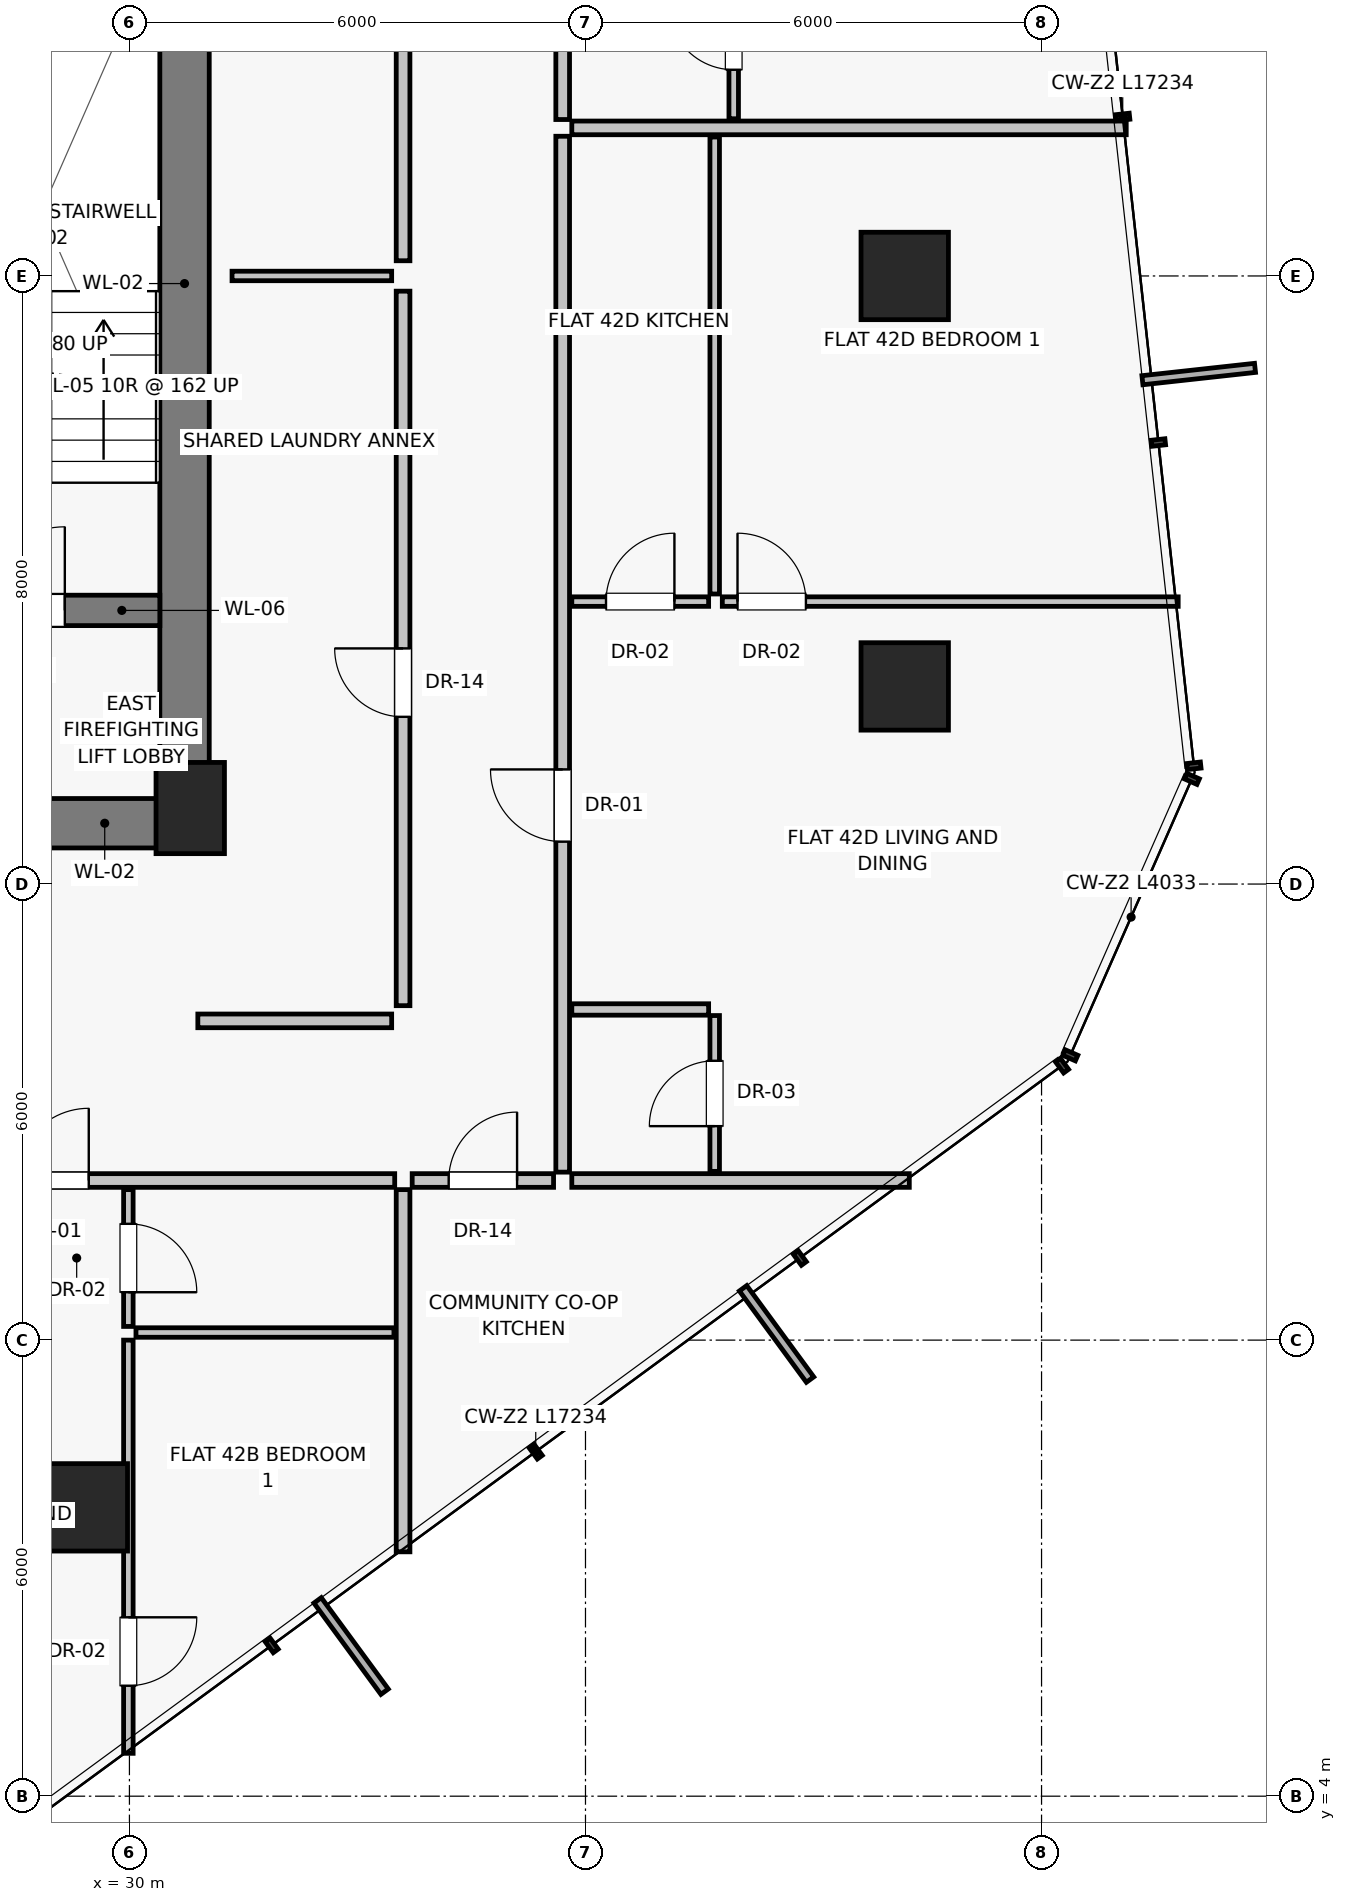
"""IFC4 building model, lengths in metres.
Left out: names, types, materials, properties, quantities, classifications, styles, units other than length and angle.
Written with IfcOpenShell. Run it as: python <this file> out.ifc"""

import sys

from ifc_helpers import new_model, si_unit, direction, frame, frame_2d, origin, origin_2d, place, context, subcontext, project, spatial, rectangle, extrude, source, transform, mapped, element, fill, save


model = new_model("IFC4")
c1 = context("Model", 3, precision=1e-05, world=origin(), true_north=direction((0.0, 1.0)))
c2 = subcontext(c1, "Body", "Model", "MODEL_VIEW")
j1 = project(units=[si_unit("LENGTHUNIT", "METRE"), si_unit("PLANEANGLEUNIT", "RADIAN")], contexts=[c1])
p1 = place(None, origin())
s1 = spatial("IfcSite", under=j1, at=p1, CompositionType="ELEMENT")
p2 = place(p1, origin())
s2 = spatial("IfcBuilding", under=s1, at=p2, CompositionType="ELEMENT")
p3 = place(p2, frame((0.0, 0.0, 149.0)))
s3 = spatial("IfcBuildingStorey", under=s2, at=p3, CompositionType="ELEMENT", Elevation=149.0)
p4 = place(p3, frame((30.8, 17.0, 0.0), z_axis=(0.0, 0.0, 1.0), x_axis=(1.0, 0.0, 0.0)))
e1 = element("IfcColumn", 1, at=p4, inside=s3, PredefinedType="PILASTER", context=c2, shape_type="SweptSolid", body=[
    extrude(rectangle(XDim=0.9, YDim=1.2, at=origin_2d()), origin(), (0.0, 0.0, 1.0), 3.25),
])
for number, where, z_axis, x_axis in (
    (2, (40.2, 18.6, 0.0), (0.0, 0.0, 1.0), (1.0, 0.0, 0.0)),
    (3, (40.2, 24.0, 0.0), (0.0, 0.0, 1.0), (1.0, 0.0, 0.0)),
    (4, (29.4, 7.8, 0.0), (0.0, 0.0, 1.0), (1.0, 0.0, 0.0)),
):
    element("IfcColumn", number, at=place(p3, frame(where, z_axis=z_axis, x_axis=x_axis)), inside=s3, PredefinedType="COLUMN", context=c2, shape_type="SweptSolid", body=[
        extrude(rectangle(XDim=1.15, YDim=1.15, at=origin_2d()), origin(), (0.0, 0.0, 1.0), 3.25),
    ])
p5 = place(p3, frame((30.725, 16.8, 0.0), z_axis=(0.0, 0.0, 1.0), x_axis=(0.0, 1.0, 0.0)))
e5 = element("IfcWall", 5, at=p5, inside=s3, PredefinedType="SHEAR", context=c2, shape_type="SweptSolid", body=[
    extrude(rectangle(XDim=14.2, YDim=0.65, at=frame_2d((7.1, 0.0))), origin(), (0.0, 0.0, 1.0), 3.0),
])
p6 = place(p3, frame((24.95, 16.8, 0.0), z_axis=(0.0, 0.0, 1.0), x_axis=(1.0, 0.0, 0.0)))
e6 = element("IfcWall", 6, at=p6, inside=s3, PredefinedType="SHEAR", context=c2, shape_type="SweptSolid", body=[
    extrude(rectangle(XDim=5.85, YDim=0.65, at=frame_2d((2.925, 0.0))), origin(), (0.0, 0.0, 1.0), 3.0),
])
p7 = place(p6, frame((2.15, 0.0, 0.0)))
e7 = element("IfcOpeningElement", 7, at=p7, cuts=e6, PredefinedType="OPENING", context=c2, shape_type="SweptSolid", body=[
    extrude(rectangle(XDim=1.2, YDim=2.03, at=frame_2d((0.6, 1.015))), frame((0.0, 0.335, 0.0), z_axis=(0.0, -1.0, 0.0), x_axis=(1.0, 0.0, 0.0)), (0.0, 0.0, 1.0), 0.67),
])
p8 = place(p3, frame((27.0, 19.6, 0.0), z_axis=(0.0, 0.0, 1.0), x_axis=(1.0, 0.0, 0.0)))
e8 = element("IfcWall", 8, at=p8, inside=s3, PredefinedType="SHEAR", context=c2, shape_type="SweptSolid", body=[
    extrude(rectangle(XDim=3.4, YDim=0.4, at=frame_2d((1.7, 0.0))), origin(), (0.0, 0.0, 1.0), 3.0),
])
p9 = place(p8, frame((1.05, 0.0, 0.0)))
e9 = element("IfcOpeningElement", 9, at=p9, cuts=e8, PredefinedType="OPENING", context=c2, shape_type="SweptSolid", body=[
    extrude(rectangle(XDim=1.1, YDim=2.03, at=frame_2d((0.55, 1.015))), frame((0.0, 0.21, 0.0), z_axis=(0.0, -1.0, 0.0), x_axis=(1.0, 0.0, 0.0)), (0.0, 0.0, 1.0), 0.42),
])
p10 = place(p3, frame((33.6, 14.4, 0.0), z_axis=(0.0, 0.0, 1.0), x_axis=(0.0, 1.0, 0.0)))
e10 = element("IfcWall", 10, at=p10, inside=s3, PredefinedType="PARTITIONING", context=c2, shape_type="SweptSolid", body=[
    extrude(rectangle(XDim=9.4, YDim=0.18, at=frame_2d((4.7, 0.0))), origin(), (0.0, 0.0, 1.0), 3.0),
])
p11 = place(p10, frame((3.8, 0.0, 0.0)))
e11 = element("IfcOpeningElement", 11, at=p11, cuts=e10, PredefinedType="OPENING", context=c2, shape_type="SweptSolid", body=[
    extrude(rectangle(XDim=0.9, YDim=2.01, at=frame_2d((0.45, 1.005))), frame((0.0, 0.1, 0.0), z_axis=(0.0, -1.0, 0.0), x_axis=(1.0, 0.0, 0.0)), (0.0, 0.0, 1.0), 0.2),
])
p12 = place(p3, frame((33.6, 24.2, 0.0), z_axis=(0.0, 0.0, 1.0), x_axis=(0.0, 1.0, 0.0)))
e12 = element("IfcWall", 12, at=p12, inside=s3, PredefinedType="PARTITIONING", context=c2, shape_type="SweptSolid", body=[
    extrude(rectangle(XDim=9.2, YDim=0.18, at=frame_2d((4.6, 0.0))), origin(), (0.0, 0.0, 1.0), 3.0),
])
p13 = place(p12, frame((3.8, 0.0, 0.0)))
e13 = element("IfcOpeningElement", 13, at=p13, cuts=e12, PredefinedType="OPENING", context=c2, shape_type="SweptSolid", body=[
    extrude(rectangle(XDim=0.9, YDim=2.01, at=frame_2d((0.45, 1.005))), frame((0.0, 0.1, 0.0), z_axis=(0.0, -1.0, 0.0), x_axis=(1.0, 0.0, 0.0)), (0.0, 0.0, 1.0), 0.2),
])
p14 = place(p3, frame((31.35, 24.0, 0.0), z_axis=(0.0, 0.0, 1.0), x_axis=(1.0, 0.0, 0.0)))
e14 = element("IfcWall", 14, at=p14, inside=s3, PredefinedType="PARTITIONING", context=c2, shape_type="SweptSolid", body=[
    extrude(rectangle(XDim=2.1, YDim=0.125, at=frame_2d((1.05, 0.0))), origin(), (0.0, 0.0, 1.0), 3.0),
])
p15 = place(p3, frame((30.9, 14.2, 0.0), z_axis=(0.0, 0.0, 1.0), x_axis=(1.0, 0.0, 0.0)))
e15 = element("IfcWall", 15, at=p15, inside=s3, PredefinedType="PARTITIONING", context=c2, shape_type="SweptSolid", body=[
    extrude(rectangle(XDim=2.55, YDim=0.18, at=frame_2d((1.275, 0.0))), origin(), (0.0, 0.0, 1.0), 3.0),
])
p16 = place(p3, frame((33.6, 11.98, 0.0), z_axis=(0.0, 0.0, 1.0), x_axis=(0.0, -1.0, 0.0)))
e16 = element("IfcWall", 16, at=p16, inside=s3, PredefinedType="PARTITIONING", context=c2, shape_type="SweptSolid", body=[
    extrude(rectangle(XDim=4.765, YDim=0.18, at=frame_2d((2.383, 0.0))), origin(), (0.0, 0.0, 1.0), 3.0),
])
p17 = place(p3, frame((25.854, 12.1, 0.0), z_axis=(0.0, 0.0, 1.0), x_axis=(1.0, 0.0, 0.0)))
e17 = element("IfcWall", 17, at=p17, inside=s3, PredefinedType="PARTITIONING", context=c2, shape_type="SweptSolid", body=[
    extrude(rectangle(XDim=7.636, YDim=0.18, at=frame_2d((3.818, 0.0))), origin(), (0.0, 0.0, 1.0), 2.58),
])
p18 = place(p17, frame((2.661, 0.0, 0.0)))
e18 = element("IfcOpeningElement", 18, at=p18, cuts=e17, PredefinedType="OPENING", context=c2, shape_type="SweptSolid", body=[
    extrude(rectangle(XDim=0.95, YDim=2.02, at=frame_2d((0.475, 1.01))), frame((0.0, 0.1, 0.0), z_axis=(0.0, -1.0, 0.0), x_axis=(1.0, 0.0, 0.0)), (0.0, 0.0, 1.0), 0.2),
])
p19 = place(p3, frame((29.986, 11.98, 0.0), z_axis=(0.0, 0.0, 1.0), x_axis=(0.0, -1.0, 0.0)))
e19 = element("IfcWall", 19, at=p19, inside=s3, PredefinedType="PARTITIONING", context=c2, shape_type="SweptSolid", body=[
    extrude(rectangle(XDim=1.8, YDim=0.125, at=frame_2d((0.9, 0.0))), origin(), (0.0, 0.0, 1.0), 2.378),
])
p20 = place(p19, frame((0.45, 0.0, 0.0)))
e20 = element("IfcOpeningElement", 20, at=p20, cuts=e19, PredefinedType="OPENING", context=c2, shape_type="SweptSolid", body=[
    extrude(rectangle(XDim=0.9, YDim=2.01, at=frame_2d((0.45, 1.005))), frame((0.0, 0.073, 0.0), z_axis=(0.0, -1.0, 0.0), x_axis=(1.0, 0.0, 0.0)), (0.0, 0.0, 1.0), 0.145),
])
p21 = place(p3, frame((30.086, 10.1, 0.0), z_axis=(0.0, 0.0, 1.0), x_axis=(1.0, 0.0, 0.0)))
e21 = element("IfcWall", 21, at=p21, inside=s3, PredefinedType="PARTITIONING", context=c2, shape_type="SweptSolid", body=[
    extrude(rectangle(XDim=3.394, YDim=0.125, at=frame_2d((1.697, 0.0))), origin(), (0.0, 0.0, 1.0), 3.0),
])
p22 = place(p3, frame((29.986, 10.0, 0.0), z_axis=(0.0, 0.0, 1.0), x_axis=(0.0, -1.0, 0.0)))
e22 = element("IfcWall", 22, at=p22, inside=s3, PredefinedType="PARTITIONING", context=c2, shape_type="SweptSolid", body=[
    extrude(rectangle(XDim=5.436, YDim=0.125, at=frame_2d((2.718, 0.0))), origin(), (0.0, 0.0, 1.0), 2.378),
])
p23 = place(p22, frame((3.647, 0.0, 0.0)))
e23 = element("IfcOpeningElement", 23, at=p23, cuts=e22, PredefinedType="OPENING", context=c2, shape_type="SweptSolid", body=[
    extrude(rectangle(XDim=0.9, YDim=2.01, at=frame_2d((0.45, 1.005))), frame((0.0, 0.073, 0.0), z_axis=(0.0, -1.0, 0.0), x_axis=(1.0, 0.0, 0.0)), (0.0, 0.0, 1.0), 0.145),
])
p24 = place(p3, frame((35.82, 12.1, 0.0), z_axis=(0.0, 0.0, 1.0), x_axis=(1.0, 0.0, 0.0)))
e24 = element("IfcWall", 24, at=p24, inside=s3, PredefinedType="PARTITIONING", context=c2, shape_type="SweptSolid", body=[
    extrude(rectangle(XDim=4.44, YDim=0.18, at=frame_2d((2.22, 0.0))), origin(), (0.0, 0.0, 1.0), 3.0),
])
p25 = place(p3, frame((35.7, 12.21, 0.0), z_axis=(0.0, 0.0, 1.0), x_axis=(0.0, 1.0, 0.0)))
e25 = element("IfcWall", 25, at=p25, inside=s3, PredefinedType="PARTITIONING", context=c2, shape_type="SweptSolid", body=[
    extrude(rectangle(XDim=13.628, YDim=0.18, at=frame_2d((6.814, 0.0))), origin(), (0.0, 0.0, 1.0), 2.58),
])
p26 = place(p25, frame((4.348, 0.0, 0.0)))
e26 = element("IfcOpeningElement", 26, at=p26, cuts=e25, PredefinedType="OPENING", context=c2, shape_type="SweptSolid", body=[
    extrude(rectangle(XDim=0.95, YDim=2.02, at=frame_2d((0.475, 1.01))), frame((0.0, 0.1, 0.0), z_axis=(0.0, -1.0, 0.0), x_axis=(1.0, 0.0, 0.0)), (0.0, 0.0, 1.0), 0.2),
])
p27 = place(p3, frame((35.82, 14.35, 0.0), z_axis=(0.0, 0.0, 1.0), x_axis=(1.0, 0.0, 0.0)))
e27 = element("IfcWall", 27, at=p27, inside=s3, PredefinedType="PARTITIONING", context=c2, shape_type="SweptSolid", body=[
    extrude(rectangle(XDim=1.8, YDim=0.15, at=frame_2d((0.9, 0.0))), origin(), (0.0, 0.0, 1.0), 3.0),
])
p28 = place(p3, frame((37.7, 12.22, 0.0), z_axis=(0.0, 0.0, 1.0), x_axis=(0.0, 1.0, 0.0)))
e28 = element("IfcWall", 28, at=p28, inside=s3, PredefinedType="PARTITIONING", context=c2, shape_type="SweptSolid", body=[
    extrude(rectangle(XDim=2.05, YDim=0.125, at=frame_2d((1.025, 0.0))), origin(), (0.0, 0.0, 1.0), 3.0),
])
p29 = place(p28, frame((0.595, 0.0, 0.0)))
e29 = element("IfcOpeningElement", 29, at=p29, cuts=e28, PredefinedType="OPENING", context=c2, shape_type="SweptSolid", body=[
    extrude(rectangle(XDim=0.86, YDim=2.01, at=frame_2d((0.43, 1.005))), frame((0.0, 0.073, 0.0), z_axis=(0.0, -1.0, 0.0), x_axis=(1.0, 0.0, 0.0)), (0.0, 0.0, 1.0), 0.145),
])
p30 = place(p3, frame((35.82, 19.716, 0.0), z_axis=(0.0, 0.0, 1.0), x_axis=(1.0, 0.0, 0.0)))
e30 = element("IfcWall", 30, at=p30, inside=s3, PredefinedType="PARTITIONING", context=c2, shape_type="SweptSolid", body=[
    extrude(rectangle(XDim=1.8, YDim=0.125, at=frame_2d((0.9, 0.0))), origin(), (0.0, 0.0, 1.0), 3.0),
])
p31 = place(p30, frame((0.45, 0.0, 0.0)))
e31 = element("IfcOpeningElement", 31, at=p31, cuts=e30, PredefinedType="OPENING", context=c2, shape_type="SweptSolid", body=[
    extrude(rectangle(XDim=0.9, YDim=2.01, at=frame_2d((0.45, 1.005))), frame((0.0, 0.073, 0.0), z_axis=(0.0, -1.0, 0.0), x_axis=(1.0, 0.0, 0.0)), (0.0, 0.0, 1.0), 0.145),
])
p32 = place(p3, frame((37.7, 19.816, 0.0), z_axis=(0.0, 0.0, 1.0), x_axis=(0.0, 1.0, 0.0)))
e32 = element("IfcWall", 32, at=p32, inside=s3, PredefinedType="PARTITIONING", context=c2, shape_type="SweptSolid", body=[
    extrude(rectangle(XDim=6.012, YDim=0.125, at=frame_2d((3.006, 0.0))), origin(), (0.0, 0.0, 1.0), 3.0),
])
p33 = place(p3, frame((37.8, 19.716, 0.0), z_axis=(0.0, 0.0, 1.0), x_axis=(1.0, 0.0, 0.0)))
e33 = element("IfcWall", 33, at=p33, inside=s3, PredefinedType="PARTITIONING", context=c2, shape_type="SweptSolid", body=[
    extrude(rectangle(XDim=5.998, YDim=0.125, at=frame_2d((2.999, 0.0))), origin(), (0.0, 0.0, 1.0), 3.0),
])
p34 = place(p33, frame((0.2, 0.0, 0.0)))
e34 = element("IfcOpeningElement", 34, at=p34, cuts=e33, PredefinedType="OPENING", context=c2, shape_type="SweptSolid", body=[
    extrude(rectangle(XDim=0.9, YDim=2.01, at=frame_2d((0.45, 1.005))), frame((0.0, 0.073, 0.0), z_axis=(0.0, -1.0, 0.0), x_axis=(1.0, 0.0, 0.0)), (0.0, 0.0, 1.0), 0.145),
])
p35 = place(p3, frame((35.82, 25.948, 0.0), z_axis=(0.0, 0.0, 1.0), x_axis=(1.0, 0.0, 0.0)))
e35 = element("IfcWall", 35, at=p35, inside=s3, PredefinedType="PARTITIONING", context=c2, shape_type="SweptSolid", body=[
    extrude(rectangle(XDim=7.294, YDim=0.18, at=frame_2d((3.647, 0.0))), origin(), (0.0, 0.0, 1.0), 3.0),
])
p36 = place(p3, frame((35.7, 26.058, 0.0), z_axis=(0.0, 0.0, 1.0), x_axis=(0.0, 1.0, 0.0)))
e36 = element("IfcWall", 36, at=p36, inside=s3, PredefinedType="PARTITIONING", context=c2, shape_type="SweptSolid", body=[
    extrude(rectangle(XDim=6.582, YDim=0.18, at=frame_2d((3.291, 0.0))), origin(), (0.0, 0.0, 1.0), 2.58),
])
p37 = place(p36, frame((4.072, 0.0, 0.0)))
e37 = element("IfcOpeningElement", 37, at=p37, cuts=e36, PredefinedType="OPENING", context=c2, shape_type="SweptSolid", body=[
    extrude(rectangle(XDim=0.95, YDim=2.02, at=frame_2d((0.475, 1.01))), frame((0.0, 0.1, 0.0), z_axis=(0.0, -1.0, 0.0), x_axis=(1.0, 0.0, 0.0)), (0.0, 0.0, 1.0), 0.2),
])
p38 = place(p3, frame((37.95, 26.068, 0.0), z_axis=(0.0, 0.0, 1.0), x_axis=(0.0, 1.0, 0.0)))
e38 = element("IfcWall", 38, at=p38, inside=s3, PredefinedType="PARTITIONING", context=c2, shape_type="SweptSolid", body=[
    extrude(rectangle(XDim=2.15, YDim=0.125, at=frame_2d((1.075, 0.0))), origin(), (0.0, 0.0, 1.0), 3.0),
])
p39 = place(p38, frame((0.645, 0.0, 0.0)))
e39 = element("IfcOpeningElement", 39, at=p39, cuts=e38, PredefinedType="OPENING", context=c2, shape_type="SweptSolid", body=[
    extrude(rectangle(XDim=0.86, YDim=2.01, at=frame_2d((0.43, 1.005))), frame((0.0, 0.073, 0.0), z_axis=(0.0, -1.0, 0.0), x_axis=(1.0, 0.0, 0.0)), (0.0, 0.0, 1.0), 0.145),
])
p40 = place(p3, frame((33.72, 12.1, 0.0), z_axis=(0.0, 0.0, 1.0), x_axis=(1.0, 0.0, 0.0)))
e40 = element("IfcWall", 40, at=p40, inside=s3, PredefinedType="PARTITIONING", context=c2, shape_type="SweptSolid", body=[
    extrude(rectangle(XDim=1.86, YDim=0.18, at=frame_2d((0.93, 0.0))), origin(), (0.0, 0.0, 1.0), 3.0),
])
p41 = place(p40, frame((0.48, 0.0, 0.0)))
e41 = element("IfcOpeningElement", 41, at=p41, cuts=e40, PredefinedType="OPENING", context=c2, shape_type="SweptSolid", body=[
    extrude(rectangle(XDim=0.9, YDim=2.01, at=frame_2d((0.45, 1.005))), frame((0.0, 0.1, 0.0), z_axis=(0.0, -1.0, 0.0), x_axis=(1.0, 0.0, 0.0)), (0.0, 0.0, 1.0), 0.2),
])
m1 = source(origin(), c2, "Body", "SweptSolid", [
    extrude(rectangle(XDim=1.1, YDim=2.03, at=frame_2d((0.55, 1.015))), frame((0.0, 0.025, 0.0), z_axis=(0.0, -1.0, 0.0), x_axis=(1.0, 0.0, 0.0)), (0.0, 0.0, 1.0), 0.05),
])
p42 = place(p9, origin())
e42 = element("IfcDoor", 42, at=p42, inside=s3, OperationType="SINGLE_SWING_RIGHT", PredefinedType="DOOR", context=c2, shape_type="MappedRepresentation", body=[
    mapped(m1, transform((0.0, 0.0, 0.0), scale=1.0)),
])
fill(e9, e42)
m2 = source(origin(), c2, "Body", "SweptSolid", [
    extrude(rectangle(XDim=0.9, YDim=2.01, at=frame_2d((0.45, 1.005))), frame((0.0, 0.025, 0.0), z_axis=(0.0, -1.0, 0.0), x_axis=(1.0, 0.0, 0.0)), (0.0, 0.0, 1.0), 0.05),
])
p43 = place(p11, origin())
e43 = element("IfcDoor", 43, at=p43, inside=s3, OperationType="SINGLE_SWING_RIGHT", PredefinedType="DOOR", context=c2, shape_type="MappedRepresentation", body=[
    mapped(m2, transform((0.0, 0.0, 0.0), scale=1.0)),
])
fill(e11, e43)
m3 = source(origin(), c2, "Body", "SweptSolid", [
    extrude(rectangle(XDim=0.95, YDim=2.02, at=frame_2d((0.475, 1.01))), frame((0.0, 0.025, 0.0), z_axis=(0.0, -1.0, 0.0), x_axis=(1.0, 0.0, 0.0)), (0.0, 0.0, 1.0), 0.05),
])
p44 = place(p18, origin())
e44 = element("IfcDoor", 44, at=p44, inside=s3, OperationType="SINGLE_SWING_RIGHT", PredefinedType="DOOR", context=c2, shape_type="MappedRepresentation", body=[
    mapped(m3, transform((0.0, 0.0, 0.0), scale=1.0)),
])
fill(e18, e44)
p45 = place(p20, origin())
e45 = element("IfcDoor", 45, at=p45, inside=s3, OperationType="SINGLE_SWING_RIGHT", PredefinedType="DOOR", context=c2, shape_type="MappedRepresentation", body=[
    mapped(m2, transform((0.0, 0.0, 0.0), scale=1.0)),
])
fill(e20, e45)
p46 = place(p23, origin())
e46 = element("IfcDoor", 46, at=p46, inside=s3, OperationType="SINGLE_SWING_LEFT", PredefinedType="DOOR", context=c2, shape_type="MappedRepresentation", body=[
    mapped(m2, transform((0.0, 0.0, 0.0), scale=1.0)),
])
fill(e23, e46)
p47 = place(p26, origin())
e47 = element("IfcDoor", 47, at=p47, inside=s3, OperationType="SINGLE_SWING_RIGHT", PredefinedType="DOOR", context=c2, shape_type="MappedRepresentation", body=[
    mapped(m3, transform((0.0, 0.0, 0.0), scale=1.0)),
])
fill(e26, e47)
m4 = source(origin(), c2, "Body", "SweptSolid", [
    extrude(rectangle(XDim=0.86, YDim=2.01, at=frame_2d((0.43, 1.005))), frame((0.0, 0.025, 0.0), z_axis=(0.0, -1.0, 0.0), x_axis=(1.0, 0.0, 0.0)), (0.0, 0.0, 1.0), 0.05),
])
p48 = place(p29, origin())
e48 = element("IfcDoor", 48, at=p48, inside=s3, OperationType="SINGLE_SWING_LEFT", PredefinedType="DOOR", context=c2, shape_type="MappedRepresentation", body=[
    mapped(m4, transform((0.0, 0.0, 0.0), scale=1.0)),
])
fill(e29, e48)
p49 = place(p31, origin())
e49 = element("IfcDoor", 49, at=p49, inside=s3, OperationType="SINGLE_SWING_RIGHT", PredefinedType="DOOR", context=c2, shape_type="MappedRepresentation", body=[
    mapped(m2, transform((0.0, 0.0, 0.0), scale=1.0)),
])
fill(e31, e49)
p50 = place(p34, origin())
e50 = element("IfcDoor", 50, at=p50, inside=s3, OperationType="SINGLE_SWING_LEFT", PredefinedType="DOOR", context=c2, shape_type="MappedRepresentation", body=[
    mapped(m2, transform((0.0, 0.0, 0.0), scale=1.0)),
])
fill(e34, e50)
p51 = place(p39, origin())
e51 = element("IfcDoor", 51, at=p51, inside=s3, OperationType="SINGLE_SWING_RIGHT", PredefinedType="DOOR", context=c2, shape_type="MappedRepresentation", body=[
    mapped(m4, transform((0.0, 0.0, 0.0), scale=1.0)),
])
fill(e39, e51)
p52 = place(p41, origin())
e52 = element("IfcDoor", 52, at=p52, inside=s3, OperationType="SINGLE_SWING_RIGHT", PredefinedType="DOOR", context=c2, shape_type="MappedRepresentation", body=[
    mapped(m2, transform((0.0, 0.0, 0.0), scale=1.0)),
])
fill(e41, e52)
save(model, sys.argv[1])
